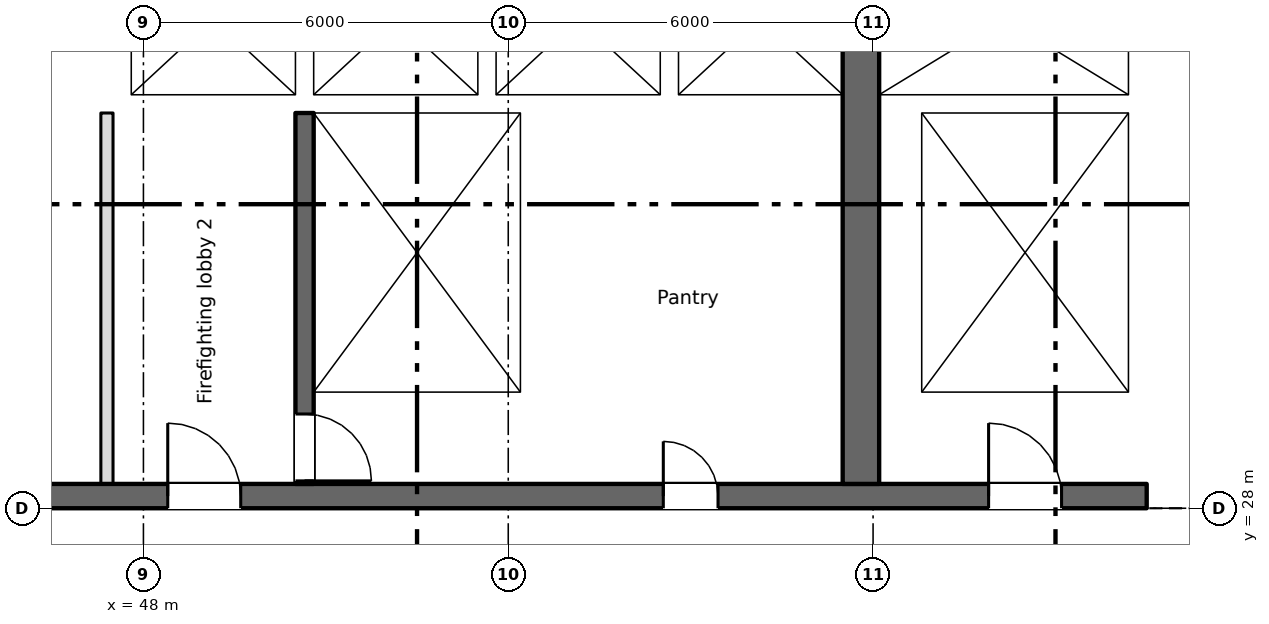
"""IFC4 building model, lengths in metres.
Left out: names, types, materials, properties, quantities, classifications, styles, units other than length and angle.
Written with IfcOpenShell. Run it as: python <this file> out.ifc"""

import sys

from ifc_helpers import new_model, si_unit, direction, frame, frame_2d, origin, place, context, subcontext, project, spatial, rectangle, extrude, element, fill, save


model = new_model("IFC4")
c1 = context("Model", 3, precision=1e-05, world=origin(), true_north=direction((0.0, 1.0)))
c2 = subcontext(c1, "Body", "Model", "MODEL_VIEW")
j1 = project(units=[si_unit("LENGTHUNIT", "METRE"), si_unit("PLANEANGLEUNIT", "RADIAN")], contexts=[c1])
p1 = place(None, origin())
s1 = spatial("IfcSite", under=j1, at=p1, CompositionType="ELEMENT")
p2 = place(p1, origin())
s2 = spatial("IfcBuilding", under=s1, at=p2, CompositionType="ELEMENT")
p3 = place(p2, frame((0.0, 0.0, 254.55)))
s3 = spatial("IfcBuildingStorey", under=s2, at=p3, CompositionType="ELEMENT", Elevation=254.55)
p4 = place(p3, frame((6.5, 28.2, 0.0), z_axis=(0.0, 0.0, 1.0), x_axis=(1.0, 0.0, 0.0)))
e1 = element("IfcWall", 1, at=p4, inside=s3, PredefinedType="SHEAR", context=c2, shape_type="SweptSolid", body=[
    extrude(rectangle(XDim=58.0, YDim=0.4, at=frame_2d((29.0, 0.0))), origin(), (0.0, 0.0, 1.0), 3.4),
])
p5 = place(p4, frame((12.762, 0.0, 0.0)))
e2 = element("IfcOpeningElement", 2, at=p5, cuts=e1, PredefinedType="OPENING", context=c2, shape_type="SweptSolid", body=[
    extrude(rectangle(XDim=0.9, YDim=2.1, at=frame_2d((0.45, 1.05))), frame((0.0, 0.21, 0.0), z_axis=(0.0, -1.0, 0.0), x_axis=(1.0, 0.0, 0.0)), (0.0, 0.0, 1.0), 0.42),
])
p6 = place(p4, frame((15.337, 0.0, 0.0)))
e3 = element("IfcOpeningElement", 3, at=p6, cuts=e1, PredefinedType="OPENING", context=c2, shape_type="SweptSolid", body=[
    extrude(rectangle(XDim=0.9, YDim=2.1, at=frame_2d((0.45, 1.05))), frame((0.0, 0.21, 0.0), z_axis=(0.0, -1.0, 0.0), x_axis=(1.0, 0.0, 0.0)), (0.0, 0.0, 1.0), 0.42),
])
p7 = place(p4, frame((50.05, 0.0, 0.0)))
e4 = element("IfcOpeningElement", 4, at=p7, cuts=e1, PredefinedType="OPENING", context=c2, shape_type="SweptSolid", body=[
    extrude(rectangle(XDim=0.9, YDim=2.1, at=frame_2d((0.45, 1.05))), frame((0.0, 0.21, 0.0), z_axis=(0.0, -1.0, 0.0), x_axis=(1.0, 0.0, 0.0)), (0.0, 0.0, 1.0), 0.42),
])
p8 = place(p4, frame((0.762, 0.0, 0.0)))
e5 = element("IfcOpeningElement", 5, at=p8, cuts=e1, PredefinedType="OPENING", context=c2, shape_type="SweptSolid", body=[
    extrude(rectangle(XDim=0.9, YDim=2.1, at=frame_2d((0.45, 1.05))), frame((0.0, 0.21, 0.0), z_axis=(0.0, -1.0, 0.0), x_axis=(1.0, 0.0, 0.0)), (0.0, 0.0, 1.0), 0.42),
])
p9 = place(p4, frame((2.337, 0.0, 0.0)))
e6 = element("IfcOpeningElement", 6, at=p9, cuts=e1, PredefinedType="OPENING", context=c2, shape_type="SweptSolid", body=[
    extrude(rectangle(XDim=0.9, YDim=2.1, at=frame_2d((0.45, 1.05))), frame((0.0, 0.21, 0.0), z_axis=(0.0, -1.0, 0.0), x_axis=(1.0, 0.0, 0.0)), (0.0, 0.0, 1.0), 0.42),
])
p10 = place(p4, frame((4.9, 0.0, 0.0)))
e7 = element("IfcOpeningElement", 7, at=p10, cuts=e1, PredefinedType="OPENING", context=c2, shape_type="SweptSolid", body=[
    extrude(rectangle(XDim=1.2, YDim=2.1, at=frame_2d((0.6, 1.05))), frame((0.0, 0.21, 0.0), z_axis=(0.0, -1.0, 0.0), x_axis=(1.0, 0.0, 0.0)), (0.0, 0.0, 1.0), 0.42),
])
p11 = place(p4, frame((31.9, 0.0, 0.0)))
e8 = element("IfcOpeningElement", 8, at=p11, cuts=e1, PredefinedType="OPENING", context=c2, shape_type="SweptSolid", body=[
    extrude(rectangle(XDim=1.2, YDim=2.1, at=frame_2d((0.6, 1.05))), frame((0.0, 0.21, 0.0), z_axis=(0.0, -1.0, 0.0), x_axis=(1.0, 0.0, 0.0)), (0.0, 0.0, 1.0), 0.42),
])
p12 = place(p4, frame((55.4, 0.0, 0.0)))
e9 = element("IfcOpeningElement", 9, at=p12, cuts=e1, PredefinedType="OPENING", context=c2, shape_type="SweptSolid", body=[
    extrude(rectangle(XDim=1.2, YDim=2.1, at=frame_2d((0.6, 1.05))), frame((0.0, 0.21, 0.0), z_axis=(0.0, -1.0, 0.0), x_axis=(1.0, 0.0, 0.0)), (0.0, 0.0, 1.0), 0.42),
])
p13 = place(p4, frame((21.9, 0.0, 0.0)))
e10 = element("IfcOpeningElement", 10, at=p13, cuts=e1, PredefinedType="OPENING", context=c2, shape_type="SweptSolid", body=[
    extrude(rectangle(XDim=1.2, YDim=2.1, at=frame_2d((0.6, 1.05))), frame((0.0, 0.21, 0.0), z_axis=(0.0, -1.0, 0.0), x_axis=(1.0, 0.0, 0.0)), (0.0, 0.0, 1.0), 0.42),
])
p14 = place(p4, frame((41.9, 0.0, 0.0)))
e11 = element("IfcOpeningElement", 11, at=p14, cuts=e1, PredefinedType="OPENING", context=c2, shape_type="SweptSolid", body=[
    extrude(rectangle(XDim=1.2, YDim=2.1, at=frame_2d((0.6, 1.05))), frame((0.0, 0.21, 0.0), z_axis=(0.0, -1.0, 0.0), x_axis=(1.0, 0.0, 0.0)), (0.0, 0.0, 1.0), 0.42),
])
p15 = place(p4, frame((25.05, 0.0, 0.0)))
e12 = element("IfcOpeningElement", 12, at=p15, cuts=e1, PredefinedType="OPENING", context=c2, shape_type="SweptSolid", body=[
    extrude(rectangle(XDim=2.4, YDim=2.1, at=frame_2d((1.2, 1.05))), frame((0.0, 0.21, 0.0), z_axis=(0.0, -1.0, 0.0), x_axis=(1.0, 0.0, 0.0)), (0.0, 0.0, 1.0), 0.42),
])
p16 = place(p4, frame((37.55, 0.0, 0.0)))
e13 = element("IfcOpeningElement", 13, at=p16, cuts=e1, PredefinedType="OPENING", context=c2, shape_type="SweptSolid", body=[
    extrude(rectangle(XDim=2.4, YDim=2.1, at=frame_2d((1.2, 1.05))), frame((0.0, 0.21, 0.0), z_axis=(0.0, -1.0, 0.0), x_axis=(1.0, 0.0, 0.0)), (0.0, 0.0, 1.0), 0.42),
])
p17 = place(p4, frame((8.25, 0.0, 0.0)))
e14 = element("IfcOpeningElement", 14, at=p17, cuts=e1, PredefinedType="OPENING", context=c2, shape_type="SweptSolid", body=[
    extrude(rectangle(XDim=2.4, YDim=2.1, at=frame_2d((1.2, 1.05))), frame((0.0, 0.21, 0.0), z_axis=(0.0, -1.0, 0.0), x_axis=(1.0, 0.0, 0.0)), (0.0, 0.0, 1.0), 0.42),
])
p18 = place(p4, frame((29.05, 0.0, 0.0)))
e15 = element("IfcOpeningElement", 15, at=p18, cuts=e1, PredefinedType="OPENING", context=c2, shape_type="SweptSolid", body=[
    extrude(rectangle(XDim=0.9, YDim=2.1, at=frame_2d((0.45, 1.05))), frame((0.0, 0.21, 0.0), z_axis=(0.0, -1.0, 0.0), x_axis=(1.0, 0.0, 0.0)), (0.0, 0.0, 1.0), 0.42),
])
p19 = place(p4, frame((35.05, 0.0, 0.0)))
e16 = element("IfcOpeningElement", 16, at=p19, cuts=e1, PredefinedType="OPENING", context=c2, shape_type="SweptSolid", body=[
    extrude(rectangle(XDim=0.9, YDim=2.1, at=frame_2d((0.45, 1.05))), frame((0.0, 0.21, 0.0), z_axis=(0.0, -1.0, 0.0), x_axis=(1.0, 0.0, 0.0)), (0.0, 0.0, 1.0), 0.42),
])
p20 = place(p3, frame((64.35, 34.8, 0.0), z_axis=(0.0, 0.0, 1.0), x_axis=(0.0, 1.0, 0.0)))
e17 = element("IfcWall", 17, at=p20, inside=s3, PredefinedType="SHEAR", context=c2, shape_type="SweptSolid", body=[
    extrude(rectangle(XDim=6.45, YDim=0.3, at=frame_2d((3.225, 0.0))), origin(), (0.0, 0.0, 1.0), 3.4),
])
p21 = place(p3, frame((59.8, 28.4, 0.0), z_axis=(0.0, 0.0, 1.0), x_axis=(0.0, 1.0, 0.0)))
e18 = element("IfcWall", 18, at=p21, inside=s3, PredefinedType="SHEAR", context=c2, shape_type="SweptSolid", body=[
    extrude(rectangle(XDim=15.1, YDim=0.6, at=frame_2d((7.55, 0.0))), origin(), (0.0, 0.0, 1.0), 3.4),
])
p22 = place(p21, frame((9.6, 0.0, 0.0)))
e19 = element("IfcOpeningElement", 19, at=p22, cuts=e18, PredefinedType="OPENING", context=c2, shape_type="SweptSolid", body=[
    extrude(rectangle(XDim=2.0, YDim=2.1, at=frame_2d((1.0, 1.05))), frame((0.0, 0.31, 0.0), z_axis=(0.0, -1.0, 0.0), x_axis=(1.0, 0.0, 0.0)), (0.0, 0.0, 1.0), 0.62),
])
p23 = place(p3, frame((50.65, 34.5, 0.0), z_axis=(0.0, 0.0, 1.0), x_axis=(0.0, -1.0, 0.0)))
e20 = element("IfcWall", 20, at=p23, inside=s3, PredefinedType="SHEAR", context=c2, shape_type="SweptSolid", body=[
    extrude(rectangle(XDim=6.1, YDim=0.3, at=frame_2d((3.05, 0.0))), origin(), (0.0, 0.0, 1.0), 3.4),
])
p24 = place(p23, frame((4.95, 0.0, 0.0)))
e21 = element("IfcOpeningElement", 21, at=p24, cuts=e20, PredefinedType="OPENING", context=c2, shape_type="SweptSolid", body=[
    extrude(rectangle(XDim=1.1, YDim=2.1, at=frame_2d((0.55, 1.05))), frame((0.0, 0.16, 0.0), z_axis=(0.0, -1.0, 0.0), x_axis=(1.0, 0.0, 0.0)), (0.0, 0.0, 1.0), 0.32),
])
p25 = place(p3, frame((54.35, 28.4, 0.0), z_axis=(0.0, 0.0, 1.0), x_axis=(0.0, 1.0, 0.0)))
e22 = element("IfcWall", 22, at=p25, inside=s3, PredefinedType="SHEAR", context=c2, shape_type="SweptSolid", body=[
    extrude(rectangle(XDim=6.1, YDim=0.3, at=frame_2d((3.05, 0.0))), origin(), (0.0, 0.0, 1.0), 3.4),
])
p26 = place(p3, frame((60.45, 28.4, 0.0), z_axis=(0.0, 0.0, 1.0), x_axis=(0.0, 1.0, 0.0)))
e23 = element("IfcWall", 23, at=p26, inside=s3, PredefinedType="SHEAR", context=c2, shape_type="SweptSolid", body=[
    extrude(rectangle(XDim=6.1, YDim=0.7, at=frame_2d((3.05, 0.0))), origin(), (0.0, 0.0, 1.0), 3.4),
])
p27 = place(p3, frame((64.35, 28.4, 0.0), z_axis=(0.0, 0.0, 1.0), x_axis=(0.0, 1.0, 0.0)))
e24 = element("IfcWall", 24, at=p27, inside=s3, PredefinedType="SHEAR", context=c2, shape_type="SweptSolid", body=[
    extrude(rectangle(XDim=6.1, YDim=0.3, at=frame_2d((3.05, 0.0))), origin(), (0.0, 0.0, 1.0), 3.4),
])
p28 = place(p3, frame((47.3, 34.65, 0.0), z_axis=(0.0, 0.0, 1.0), x_axis=(1.0, 0.0, 0.0)))
e25 = element("IfcWall", 25, at=p28, inside=s3, PredefinedType="SHEAR", context=c2, shape_type="SweptSolid", body=[
    extrude(rectangle(XDim=12.2, YDim=0.3, at=frame_2d((6.1, 0.0))), origin(), (0.0, 0.0, 1.0), 3.4),
])
p29 = place(p28, frame((1.3, 0.0, 0.0)))
e26 = element("IfcOpeningElement", 26, at=p29, cuts=e25, PredefinedType="OPENING", context=c2, shape_type="SweptSolid", body=[
    extrude(rectangle(XDim=1.1, YDim=2.1, at=frame_2d((0.55, 1.05))), frame((0.0, 0.16, 0.0), z_axis=(0.0, -1.0, 0.0), x_axis=(1.0, 0.0, 0.0)), (0.0, 0.0, 1.0), 0.32),
])
p30 = place(p3, frame((60.1, 34.65, 0.0), z_axis=(0.0, 0.0, 1.0), x_axis=(1.0, 0.0, 0.0)))
e27 = element("IfcWall", 27, at=p30, inside=s3, PredefinedType="SHEAR", context=c2, shape_type="SweptSolid", body=[
    extrude(rectangle(XDim=4.4, YDim=0.3, at=frame_2d((2.2, 0.0))), origin(), (0.0, 0.0, 1.0), 3.4),
])
p31 = place(p3, frame((47.55, 34.8, 0.0), z_axis=(0.0, 0.0, 1.0), x_axis=(0.0, 1.0, 0.0)))
e28 = element("IfcWall", 28, at=p31, inside=s3, PredefinedType="SHEAR", context=c2, shape_type="SweptSolid", body=[
    extrude(rectangle(XDim=2.5, YDim=0.5, at=frame_2d((1.25, 0.0))), origin(), (0.0, 0.0, 1.0), 3.4),
])
for number, where, z_axis, x_axis in (
    (29, (50.65, 34.8, 0.0), (0.0, 0.0, 1.0), (0.0, 1.0, 0.0)),
    (30, (53.65, 34.8, 0.0), (0.0, 0.0, 1.0), (0.0, 1.0, 0.0)),
    (31, (56.65, 34.8, 0.0), (0.0, 0.0, 1.0), (0.0, 1.0, 0.0)),
):
    element("IfcWall", number, at=place(p3, frame(where, z_axis=z_axis, x_axis=x_axis)), inside=s3, PredefinedType="SHEAR", context=c2, shape_type="SweptSolid", body=[
        extrude(rectangle(XDim=2.5, YDim=0.3, at=frame_2d((1.25, 0.0))), origin(), (0.0, 0.0, 1.0), 3.4),
    ])
p32 = place(p3, frame((47.4, 28.4, 0.0), z_axis=(0.0, 0.0, 1.0), x_axis=(0.0, 1.0, 0.0)))
e32 = element("IfcWall", 32, at=p32, inside=s3, PredefinedType="PARTITIONING", context=c2, shape_type="SweptSolid", body=[
    extrude(rectangle(XDim=6.1, YDim=0.2, at=frame_2d((3.05, 0.0))), origin(), (0.0, 0.0, 1.0), 3.4),
])
p33 = place(p7, origin())
e33 = element("IfcDoor", 33, at=p33, inside=s3, OperationType="SINGLE_SWING_LEFT", PredefinedType="DOOR", context=c2, shape_type="SweptSolid", body=[
    extrude(rectangle(XDim=0.9, YDim=2.1, at=frame_2d((0.45, 1.05))), frame((0.0, 0.025, 0.0), z_axis=(0.0, -1.0, 0.0), x_axis=(1.0, 0.0, 0.0)), (0.0, 0.0, 1.0), 0.05),
])
fill(e4, e33)
p34 = place(p29, origin())
e34 = element("IfcDoor", 34, at=p34, inside=s3, OperationType="SLIDING_TO_LEFT", PredefinedType="DOOR", context=c2, shape_type="SweptSolid", body=[
    extrude(rectangle(XDim=1.1, YDim=2.1, at=frame_2d((0.55, 1.05))), frame((0.0, 0.025, 0.0), z_axis=(0.0, -1.0, 0.0), x_axis=(1.0, 0.0, 0.0)), (0.0, 0.0, 1.0), 0.05),
])
fill(e26, e34)
p35 = place(p24, origin())
e35 = element("IfcDoor", 35, at=p35, inside=s3, OperationType="SINGLE_SWING_RIGHT", PredefinedType="DOOR", context=c2, shape_type="SweptSolid", body=[
    extrude(rectangle(XDim=1.1, YDim=2.1, at=frame_2d((0.55, 1.05))), frame((0.0, 0.025, 0.0), z_axis=(0.0, -1.0, 0.0), x_axis=(1.0, 0.0, 0.0)), (0.0, 0.0, 1.0), 0.05),
])
fill(e21, e35)
p36 = place(p12, origin())
e36 = element("IfcDoor", 36, at=p36, inside=s3, OperationType="SINGLE_SWING_LEFT", PredefinedType="DOOR", context=c2, shape_type="SweptSolid", body=[
    extrude(rectangle(XDim=1.2, YDim=2.1, at=frame_2d((0.6, 1.05))), frame((0.0, 0.025, 0.0), z_axis=(0.0, -1.0, 0.0), x_axis=(1.0, 0.0, 0.0)), (0.0, 0.0, 1.0), 0.05),
])
fill(e9, e36)
p37 = place(p14, origin())
e37 = element("IfcDoor", 37, at=p37, inside=s3, OperationType="SINGLE_SWING_LEFT", PredefinedType="DOOR", context=c2, shape_type="SweptSolid", body=[
    extrude(rectangle(XDim=1.2, YDim=2.1, at=frame_2d((0.6, 1.05))), frame((0.0, 0.025, 0.0), z_axis=(0.0, -1.0, 0.0), x_axis=(1.0, 0.0, 0.0)), (0.0, 0.0, 1.0), 0.05),
])
fill(e11, e37)
save(model, sys.argv[1])
